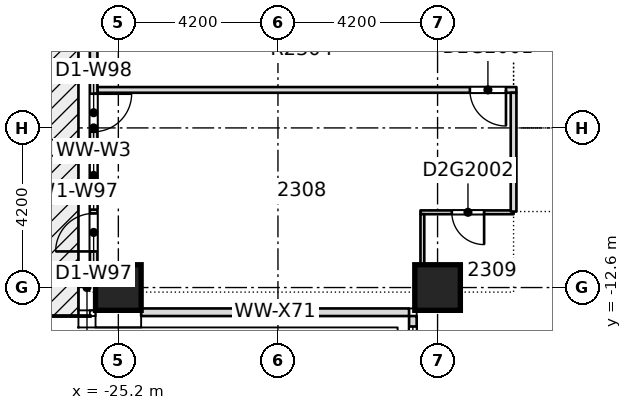
"""IFC4 building model, lengths in metres.
Left out: names, types, materials, properties, quantities, classifications, styles, units other than length and angle.
Written with IfcOpenShell. Run it as: python <this file> out.ifc"""

import sys

from ifc_helpers import new_model, si_unit, direction, frame, frame_2d, origin, origin_2d, place, context, subcontext, project, spatial, rectangle, extrude, element, fill, save


model = new_model("IFC4")
c1 = context("Model", 3, precision=1e-05, world=origin(), true_north=direction((0.0, 1.0)))
c2 = subcontext(c1, "Body", "Model", "MODEL_VIEW")
j1 = project(units=[si_unit("LENGTHUNIT", "METRE"), si_unit("PLANEANGLEUNIT", "RADIAN")], contexts=[c1])
p1 = place(None, origin())
s1 = spatial("IfcSite", under=j1, at=p1, CompositionType="ELEMENT")
p2 = place(p1, origin())
s2 = spatial("IfcBuilding", under=s1, at=p2, CompositionType="ELEMENT")
p3 = place(p2, frame((0.0, 0.0, 94.2)))
s3 = spatial("IfcBuildingStorey", under=s2, at=p3, CompositionType="ELEMENT", Elevation=94.2)
for number, where, z_axis, x_axis in (
    (1, (-25.2, -12.6, -0.32), (0.0, 0.0, 1.0), (1.0, 0.0, 0.0)),
    (2, (-16.8, -12.6, -0.32), (0.0, 0.0, 1.0), (1.0, 0.0, 0.0)),
):
    element("IfcColumn", number, at=place(p3, frame(where, z_axis=z_axis, x_axis=x_axis)), inside=s3, PredefinedType="COLUMN", context=c2, shape_type="SweptSolid", body=[
        extrude(rectangle(XDim=1.2, YDim=1.2, at=origin_2d()), origin(), (0.0, 0.0, 1.0), 3.45),
    ])
p4 = place(p3, frame((-17.25, -10.62, 0.0), z_axis=(0.0, 0.0, 1.0), x_axis=(1.0, 0.0, 0.0)))
e3 = element("IfcWall", 3, at=p4, inside=s3, PredefinedType="PARTITIONING", context=c2, shape_type="SweptSolid", body=[
    extrude(rectangle(XDim=2.45, YDim=0.1, at=frame_2d((1.225, 0.0))), origin(), (0.0, 0.0, 1.0), 3.13),
])
p5 = place(p4, frame((0.825, 0.0, 0.0)))
e4 = element("IfcOpeningElement", 4, at=p5, cuts=e3, PredefinedType="OPENING", context=c2, shape_type="SweptSolid", body=[
    extrude(rectangle(XDim=0.85, YDim=2.1, at=frame_2d((0.425, 1.05))), frame((0.0, 0.06, 0.0), z_axis=(0.0, -1.0, 0.0), x_axis=(1.0, 0.0, 0.0)), (0.0, 0.0, 1.0), 0.12),
])
p6 = place(p3, frame((-25.75, -7.4, 0.0), z_axis=(0.0, 0.0, 1.0), x_axis=(1.0, 0.0, 0.0)))
e5 = element("IfcWall", 5, at=p6, inside=s3, PredefinedType="PARTITIONING", context=c2, shape_type="SweptSolid", body=[
    extrude(rectangle(XDim=11.025, YDim=0.15, at=frame_2d((5.512, 0.0))), origin(), (0.0, 0.0, 1.0), 3.13),
])
p7 = place(p6, frame((9.8, 0.0, 0.0)))
e6 = element("IfcOpeningElement", 6, at=p7, cuts=e5, PredefinedType="OPENING", context=c2, shape_type="SweptSolid", body=[
    extrude(rectangle(XDim=0.95, YDim=2.1, at=frame_2d((0.475, 1.05))), frame((0.0, 0.085, 0.0), z_axis=(0.0, -1.0, 0.0), x_axis=(1.0, 0.0, 0.0)), (0.0, 0.0, 1.0), 0.17),
])
p8 = place(p3, frame((-17.2, -12.72, 0.0), z_axis=(0.0, 0.0, 1.0), x_axis=(0.0, 1.0, 0.0)))
e7 = element("IfcWall", 7, at=p8, inside=s3, PredefinedType="PARTITIONING", context=c2, shape_type="SweptSolid", body=[
    extrude(rectangle(XDim=2.05, YDim=0.1, at=frame_2d((1.025, 0.0))), origin(), (0.0, 0.0, 1.0), 3.13),
])
p9 = place(p3, frame((-14.8, -10.6, 0.0), z_axis=(0.0, 0.0, 1.0), x_axis=(0.0, 1.0, 0.0)))
e8 = element("IfcWall", 8, at=p9, inside=s3, PredefinedType="PARTITIONING", context=c2, shape_type="SweptSolid", body=[
    extrude(rectangle(XDim=3.125, YDim=0.15, at=frame_2d((1.562, 0.0))), origin(), (0.0, 0.0, 1.0), 3.13),
])
p10 = place(p3, frame((-25.85, -4.8, 0.0), z_axis=(0.0, 0.0, 1.0), x_axis=(0.0, -1.0, 0.0)))
e9 = element("IfcWall", 9, at=p10, inside=s3, PredefinedType="STANDARD", context=c2, shape_type="SweptSolid", body=[
    extrude(rectangle(XDim=7.2, YDim=0.2, at=frame_2d((3.6, 0.0))), origin(), (0.0, 0.0, 1.0), 3.13),
])
p11 = place(p10, frame((3.95, 0.0, 0.2)))
e10 = element("IfcOpeningElement", 10, at=p11, cuts=e9, PredefinedType="OPENING", context=c2, shape_type="SweptSolid", body=[
    extrude(rectangle(XDim=1.8, YDim=2.65, at=frame_2d((0.9, 1.325))), frame((0.0, 0.11, 0.0), z_axis=(0.0, -1.0, 0.0), x_axis=(1.0, 0.0, 0.0)), (0.0, 0.0, 1.0), 0.22),
])
p12 = place(p10, frame((5.85, 0.0, 0.0)))
e11 = element("IfcOpeningElement", 11, at=p12, cuts=e9, PredefinedType="OPENING", context=c2, shape_type="SweptSolid", body=[
    extrude(rectangle(XDim=1.0, YDim=2.4, at=frame_2d((0.5, 1.2))), frame((0.0, 0.11, 0.0), z_axis=(0.0, -1.0, 0.0), x_axis=(1.0, 0.0, 0.0)), (0.0, 0.0, 1.0), 0.22),
])
p13 = place(p10, frame((2.7, 0.0, 0.0)))
e12 = element("IfcOpeningElement", 12, at=p13, cuts=e9, PredefinedType="OPENING", context=c2, shape_type="SweptSolid", body=[
    extrude(rectangle(XDim=1.0, YDim=2.4, at=frame_2d((0.5, 1.2))), frame((0.0, 0.11, 0.0), z_axis=(0.0, -1.0, 0.0), x_axis=(1.0, 0.0, 0.0)), (0.0, 0.0, 1.0), 0.22),
])
p14 = place(p3, frame((-24.6, -13.25, 0.0), z_axis=(0.0, 0.0, 1.0), x_axis=(1.0, 0.0, 0.0)))
e13 = element("IfcWall", 13, at=p14, inside=s3, PredefinedType="STANDARD", context=c2, shape_type="SweptSolid", body=[
    extrude(rectangle(XDim=7.05, YDim=0.2, at=frame_2d((3.525, 0.0))), origin(), (0.0, 0.0, 1.0), 3.13),
])
p15 = place(p3, frame((-17.45, -13.35, 0.0), z_axis=(0.0, 0.0, 1.0), x_axis=(0.0, -1.0, 0.0)))
e14 = element("IfcWall", 14, at=p15, inside=s3, PredefinedType="STANDARD", context=c2, shape_type="SweptSolid", body=[
    extrude(rectangle(XDim=7.05, YDim=0.2, at=frame_2d((3.525, 0.0))), origin(), (0.0, 0.0, 1.0), 3.13),
])
p16 = place(p15, frame((3.8, 0.0, 0.2)))
e15 = element("IfcOpeningElement", 15, at=p16, cuts=e14, PredefinedType="OPENING", context=c2, shape_type="SweptSolid", body=[
    extrude(rectangle(XDim=1.8, YDim=2.65, at=frame_2d((0.9, 1.325))), frame((0.0, 0.11, 0.0), z_axis=(0.0, -1.0, 0.0), x_axis=(1.0, 0.0, 0.0)), (0.0, 0.0, 1.0), 0.22),
])
p17 = place(p15, frame((0.275, 0.0, 0.2)))
e16 = element("IfcOpeningElement", 16, at=p17, cuts=e14, PredefinedType="OPENING", context=c2, shape_type="SweptSolid", body=[
    extrude(rectangle(XDim=1.8, YDim=2.65, at=frame_2d((0.9, 1.325))), frame((0.0, 0.11, 0.0), z_axis=(0.0, -1.0, 0.0), x_axis=(1.0, 0.0, 0.0)), (0.0, 0.0, 1.0), 0.22),
])
p18 = place(p7, origin())
e17 = element("IfcDoor", 17, at=p18, inside=s3, OperationType="SINGLE_SWING_RIGHT", PredefinedType="DOOR", context=c2, shape_type="SweptSolid", body=[
    extrude(rectangle(XDim=0.95, YDim=2.1, at=frame_2d((0.475, 1.05))), frame((0.0, 0.025, 0.0), z_axis=(0.0, -1.0, 0.0), x_axis=(1.0, 0.0, 0.0)), (0.0, 0.0, 1.0), 0.05),
])
fill(e6, e17)
p19 = place(p5, origin())
e18 = element("IfcDoor", 18, at=p19, inside=s3, OperationType="SINGLE_SWING_RIGHT", PredefinedType="DOOR", context=c2, shape_type="SweptSolid", body=[
    extrude(rectangle(XDim=0.85, YDim=2.1, at=frame_2d((0.425, 1.05))), frame((0.0, 0.025, 0.0), z_axis=(0.0, -1.0, 0.0), x_axis=(1.0, 0.0, 0.0)), (0.0, 0.0, 1.0), 0.05),
])
fill(e4, e18)
p20 = place(p11, origin())
e19 = element("IfcWindow", 19, at=p20, inside=s3, PartitioningType="SINGLE_PANEL", PredefinedType="WINDOW", context=c2, shape_type="SweptSolid", body=[
    extrude(rectangle(XDim=1.8, YDim=2.65, at=frame_2d((0.9, 1.325))), frame((0.0, 0.03, 0.0), z_axis=(0.0, -1.0, 0.0), x_axis=(1.0, 0.0, 0.0)), (0.0, 0.0, 1.0), 0.06),
])
fill(e10, e19)
p21 = place(p12, origin())
e20 = element("IfcDoor", 20, at=p21, inside=s3, OperationType="SINGLE_SWING_LEFT", PredefinedType="DOOR", context=c2, shape_type="SweptSolid", body=[
    extrude(rectangle(XDim=1.0, YDim=2.4, at=frame_2d((0.5, 1.2))), frame((0.0, 0.025, 0.0), z_axis=(0.0, -1.0, 0.0), x_axis=(1.0, 0.0, 0.0)), (0.0, 0.0, 1.0), 0.05),
])
fill(e11, e20)
p22 = place(p13, origin())
e21 = element("IfcDoor", 21, at=p22, inside=s3, OperationType="SINGLE_SWING_LEFT", PredefinedType="DOOR", context=c2, shape_type="SweptSolid", body=[
    extrude(rectangle(XDim=1.0, YDim=2.4, at=frame_2d((0.5, 1.2))), frame((0.0, 0.025, 0.0), z_axis=(0.0, -1.0, 0.0), x_axis=(1.0, 0.0, 0.0)), (0.0, 0.0, 1.0), 0.05),
])
fill(e12, e21)
p23 = place(p17, origin())
e22 = element("IfcWindow", 22, at=p23, inside=s3, PartitioningType="SINGLE_PANEL", PredefinedType="WINDOW", context=c2, shape_type="SweptSolid", body=[
    extrude(rectangle(XDim=1.8, YDim=2.65, at=frame_2d((0.9, 1.325))), frame((0.0, 0.03, 0.0), z_axis=(0.0, -1.0, 0.0), x_axis=(1.0, 0.0, 0.0)), (0.0, 0.0, 1.0), 0.06),
])
fill(e16, e22)
save(model, sys.argv[1])
